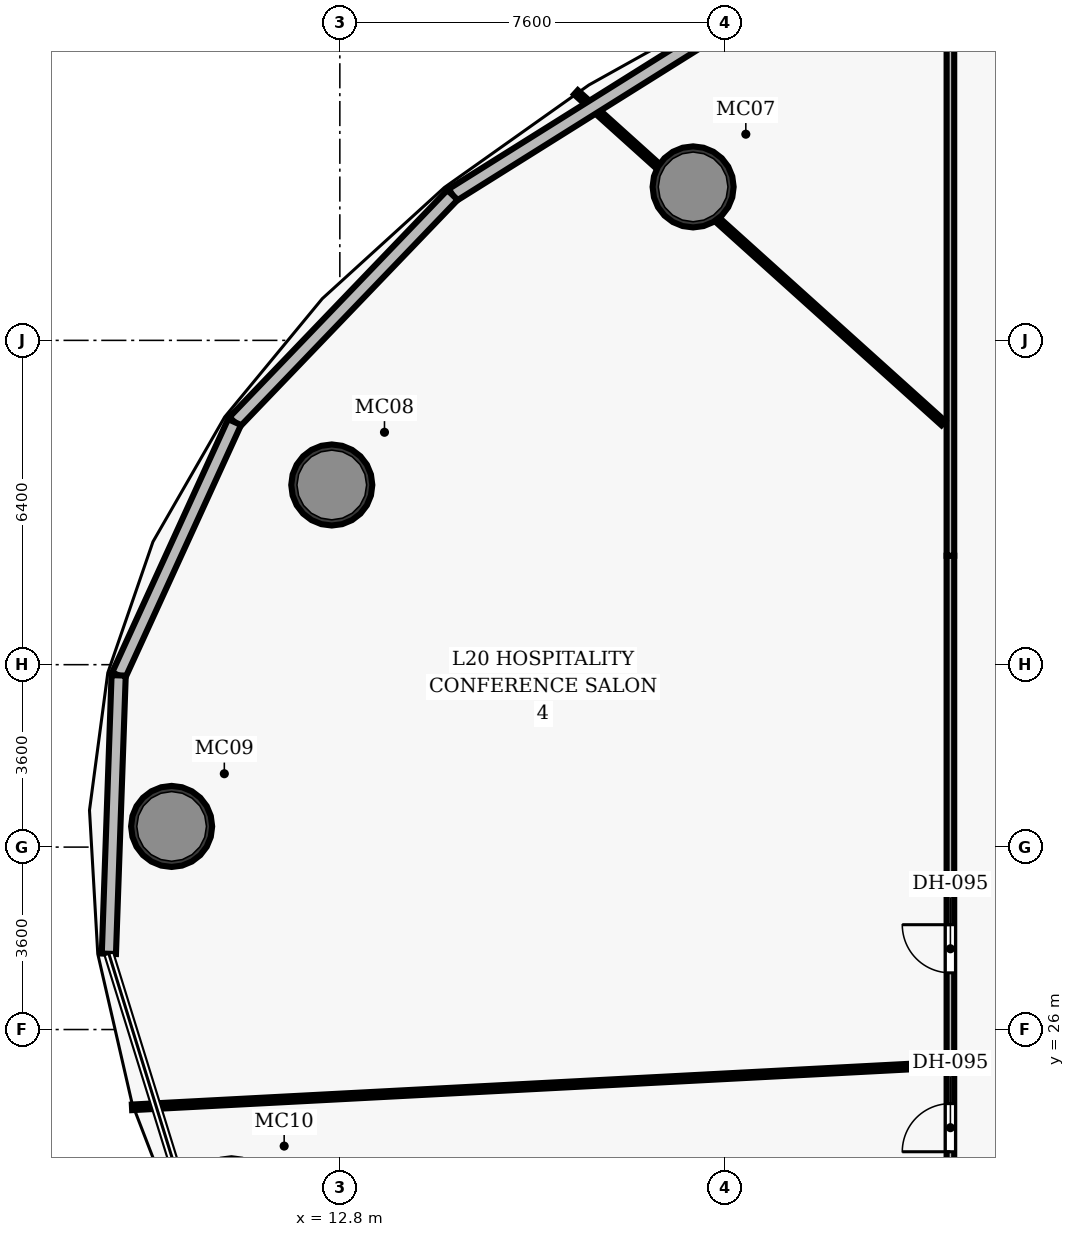
"""IFC4 building model, lengths in metres.
Left out: names, types, materials, properties, quantities, classifications, styles, units other than length and angle.
Written with IfcOpenShell. Run it as: python <this file> out.ifc"""

import sys

from ifc_helpers import new_model, si_unit, direction, frame, frame_2d, origin, origin_2d, place, context, subcontext, project, spatial, rectangle, hollow_circle, extrude, element, fill, save


model = new_model("IFC4")
c1 = context("Model", 3, precision=1e-05, world=origin(), true_north=direction((0.0, 1.0)))
c2 = subcontext(c1, "Body", "Model", "MODEL_VIEW")
j1 = project(units=[si_unit("LENGTHUNIT", "METRE"), si_unit("PLANEANGLEUNIT", "RADIAN")], contexts=[c1])
p1 = place(None, origin())
s1 = spatial("IfcSite", under=j1, at=p1, CompositionType="ELEMENT")
p2 = place(p1, origin())
s2 = spatial("IfcBuilding", under=s1, at=p2, CompositionType="ELEMENT")
p3 = place(p2, frame((0.0, 0.0, 86.9)))
s3 = spatial("IfcBuildingStorey", under=s2, at=p3, CompositionType="ELEMENT", Elevation=86.9)
for number, where, z_axis, x_axis in (
    (1, (19.772, 42.629, 0.0), (0.0, 0.0, 1.0), (1.0, 0.0, 0.0)),
    (2, (12.641, 36.746, 0.0), (0.0, 0.0, 1.0), (1.0, 0.0, 0.0)),
    (3, (9.48, 30.008, 0.0), (0.0, 0.0, 1.0), (1.0, 0.0, 0.0)),
):
    element("IfcColumn", number, at=place(p3, frame(where, z_axis=z_axis, x_axis=x_axis)), inside=s3, PredefinedType="COLUMN", context=c2, shape_type="SweptSolid", body=[
        extrude(hollow_circle(Radius=0.8, WallThickness=0.06, at=origin_2d()), origin(), (0.0, 0.0, 1.0), 3.5),
    ])
p4 = place(p3, frame((24.85, 19.45, 0.0), z_axis=(0.0, 0.0, 1.0), x_axis=(0.0, 1.0, 0.0)))
e4 = element("IfcWall", 4, at=p4, inside=s3, PredefinedType="PARTITIONING", context=c2, shape_type="SweptSolid", body=[
    extrude(rectangle(XDim=15.9, YDim=0.15, at=frame_2d((7.95, 0.0))), origin(), (0.0, 0.0, 1.0), 2.6),
])
p5 = place(p4, frame((7.669, 0.0, 0.0)))
e5 = element("IfcOpeningElement", 5, at=p5, cuts=e4, PredefinedType="OPENING", context=c2, shape_type="SweptSolid", body=[
    extrude(rectangle(XDim=0.95, YDim=2.15, at=frame_2d((0.475, 1.075))), frame((0.0, 0.085, 0.0), z_axis=(0.0, -1.0, 0.0), x_axis=(1.0, 0.0, 0.0)), (0.0, 0.0, 1.0), 0.17),
])
p6 = place(p4, frame((4.138, 0.0, 0.0)))
e6 = element("IfcOpeningElement", 6, at=p6, cuts=e4, PredefinedType="OPENING", context=c2, shape_type="SweptSolid", body=[
    extrude(rectangle(XDim=0.95, YDim=2.15, at=frame_2d((0.475, 1.075))), frame((0.0, 0.085, 0.0), z_axis=(0.0, -1.0, 0.0), x_axis=(1.0, 0.0, 0.0)), (0.0, 0.0, 1.0), 0.17),
])
p7 = place(p3, frame((24.85, 35.35, 0.0), z_axis=(0.0, 0.0, 1.0), x_axis=(0.0, 1.0, 0.0)))
e7 = element("IfcWall", 7, at=p7, inside=s3, PredefinedType="PARTITIONING", context=c2, shape_type="SweptSolid", body=[
    extrude(rectangle(XDim=10.15, YDim=0.15, at=frame_2d((5.075, 0.0))), origin(), (0.0, 0.0, 1.0), 2.6),
])
p8 = place(p3, frame((24.71, 37.966, 0.0), z_axis=(0.0, 0.0, 1.0), x_axis=(-0.743136101369, 0.669140295336, 0.0)))
e8 = element("IfcWall", 8, at=p8, inside=s3, PredefinedType="PARTITIONING", context=c2, shape_type="SweptSolid", body=[
    extrude(rectangle(XDim=9.756, YDim=0.11, at=frame_2d((4.878, 0.0))), origin(), (0.0, 0.0, 1.0), 2.6),
])
p9 = place(p3, frame((24.71, 25.303, 0.0), z_axis=(0.0, 0.0, 1.0), x_axis=(-0.998629623722, -0.052334258611, 0.0)))
e9 = element("IfcWall", 9, at=p9, inside=s3, PredefinedType="PARTITIONING", context=c2, shape_type="SweptSolid", body=[
    extrude(rectangle(XDim=16.034, YDim=0.11, at=frame_2d((8.017, 0.0))), origin(), (0.0, 0.0, 1.0), 2.6),
])
p10 = place(p3, frame((15.024, 42.47, 0.0), z_axis=(0.0, 0.0, 1.0), x_axis=(0.847464048159, 0.530852792287, 0.0)))
e10 = element("IfcWall", 10, at=p10, inside=s3, PredefinedType="SOLIDWALL", context=c2, shape_type="SweptSolid", body=[
    extrude(rectangle(XDim=7.143, YDim=0.28, at=frame_2d((3.571, 0.0))), origin(), (0.0, 0.0, 1.0), 3.25),
])
p11 = place(p3, frame((10.722, 37.988, 0.0), z_axis=(0.0, 0.0, 1.0), x_axis=(0.692416473414, 0.721498043896, 0.0)))
e11 = element("IfcWall", 11, at=p11, inside=s3, PredefinedType="SOLIDWALL", context=c2, shape_type="SweptSolid", body=[
    extrude(rectangle(XDim=6.212, YDim=0.28, at=frame_2d((3.106, 0.0))), origin(), (0.0, 0.0, 1.0), 3.25),
])
p12 = place(p3, frame((8.435, 32.989, 0.0), z_axis=(0.0, 0.0, 1.0), x_axis=(0.416090344284, 0.909323278814, 0.0)))
e12 = element("IfcWall", 12, at=p12, inside=s3, PredefinedType="SOLIDWALL", context=c2, shape_type="SweptSolid", body=[
    extrude(rectangle(XDim=5.497, YDim=0.28, at=frame_2d((2.749, 0.0))), origin(), (0.0, 0.0, 1.0), 3.25),
])
p13 = place(p3, frame((8.242, 27.495, 0.0), z_axis=(0.0, 0.0, 1.0), x_axis=(0.035127613865, 0.999382834926, 0.0)))
e13 = element("IfcWall", 13, at=p13, inside=s3, PredefinedType="SOLIDWALL", context=c2, shape_type="SweptSolid", body=[
    extrude(rectangle(XDim=5.498, YDim=0.28, at=frame_2d((2.749, 0.0))), origin(), (0.0, 0.0, 1.0), 3.25),
])
p14 = place(p5, origin())
e14 = element("IfcDoor", 14, at=p14, inside=s3, OperationType="SINGLE_SWING_RIGHT", PredefinedType="DOOR", context=c2, shape_type="SweptSolid", body=[
    extrude(rectangle(XDim=0.95, YDim=2.15, at=frame_2d((0.475, 1.075))), frame((0.0, 0.025, 0.0), z_axis=(0.0, -1.0, 0.0), x_axis=(1.0, 0.0, 0.0)), (0.0, 0.0, 1.0), 0.05),
])
fill(e5, e14)
p15 = place(p6, origin())
e15 = element("IfcDoor", 15, at=p15, inside=s3, OperationType="SINGLE_SWING_LEFT", PredefinedType="DOOR", context=c2, shape_type="SweptSolid", body=[
    extrude(rectangle(XDim=0.95, YDim=2.15, at=frame_2d((0.475, 1.075))), frame((0.0, 0.025, 0.0), z_axis=(0.0, -1.0, 0.0), x_axis=(1.0, 0.0, 0.0)), (0.0, 0.0, 1.0), 0.05),
])
fill(e6, e15)
save(model, sys.argv[1])
